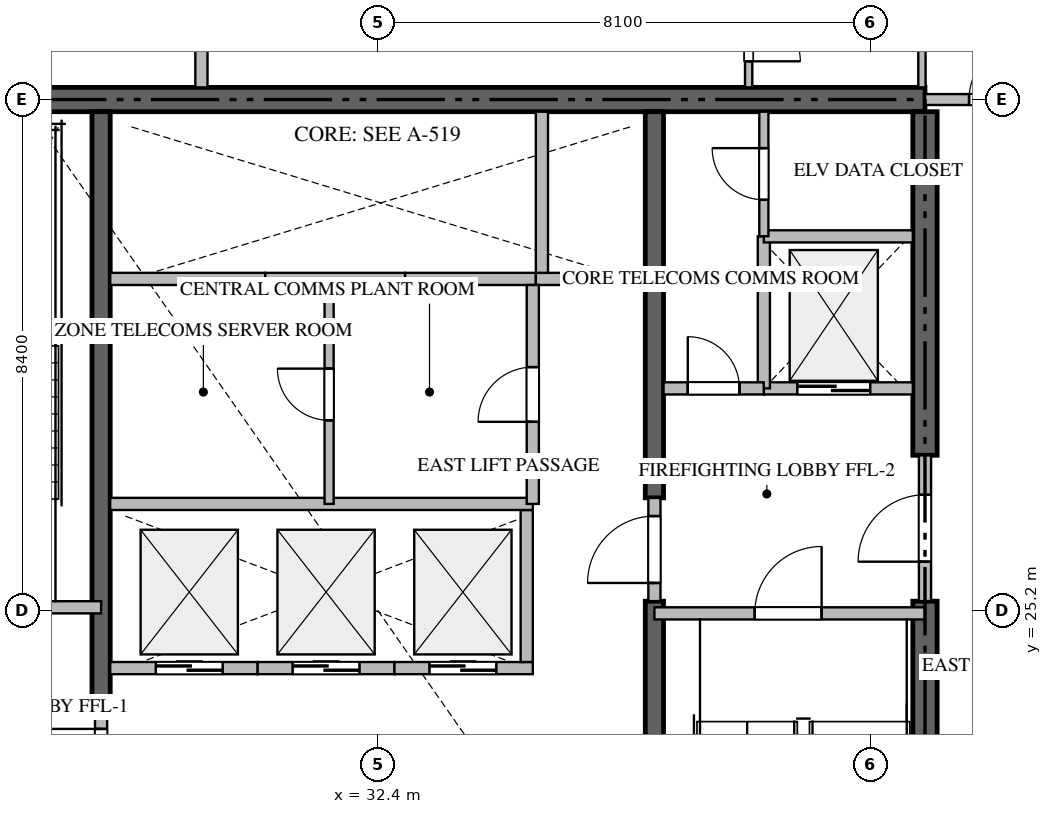
"""IFC4 building model, lengths in metres.
Left out: names, types, materials, properties, quantities, classifications, styles, units other than length and angle.
Written with IfcOpenShell. Run it as: python <this file> out.ifc"""

import sys

from ifc_helpers import new_model, si_unit, direction, frame, frame_2d, origin, place, context, subcontext, project, spatial, rectangle, extrude, source, transform, mapped, element, fill, save


model = new_model("IFC4")
c1 = context("Model", 3, precision=1e-05, world=origin(), true_north=direction((0.0, 1.0)))
c2 = subcontext(c1, "Body", "Model", "MODEL_VIEW")
j1 = project(units=[si_unit("LENGTHUNIT", "METRE"), si_unit("PLANEANGLEUNIT", "RADIAN")], contexts=[c1])
p1 = place(None, origin())
s1 = spatial("IfcSite", under=j1, at=p1, CompositionType="ELEMENT")
p2 = place(p1, origin())
s2 = spatial("IfcBuilding", under=s1, at=p2, CompositionType="ELEMENT")
p3 = place(p2, frame((0.0, 0.0, 187.65)))
s3 = spatial("IfcBuildingStorey", under=s2, at=p3, CompositionType="ELEMENT", Elevation=187.65)
p4 = place(p3, frame((41.4, 33.6, -0.26), z_axis=(0.0, 0.0, 1.0), x_axis=(-1.0, 0.0, 0.0)))
e1 = element("IfcWall", 1, at=p4, inside=s3, PredefinedType="SHEAR", context=c2, shape_type="SweptSolid", body=[
    extrude(rectangle(XDim=18.0, YDim=0.4, at=frame_2d((9.0, 0.0))), origin(), (0.0, 0.0, 1.0), 3.748),
])
p5 = place(p3, frame((41.4, 17.0, -0.26), z_axis=(0.0, 0.0, 1.0), x_axis=(0.0, 1.0, 0.0)))
e2 = element("IfcWall", 2, at=p5, inside=s3, PredefinedType="SHEAR", context=c2, shape_type="SweptSolid", body=[
    extrude(rectangle(XDim=8.35, YDim=0.4, at=frame_2d((4.175, 0.0))), origin(), (0.0, 0.0, 1.0), 3.748),
])
p6 = place(p3, frame((41.4, 27.75, -0.26), z_axis=(0.0, 0.0, 1.0), x_axis=(0.0, 1.0, 0.0)))
e3 = element("IfcWall", 3, at=p6, inside=s3, PredefinedType="SHEAR", context=c2, shape_type="SweptSolid", body=[
    extrude(rectangle(XDim=5.65, YDim=0.4, at=frame_2d((2.825, 0.0))), origin(), (0.0, 0.0, 1.0), 3.748),
])
p7 = place(p3, frame((27.85, 23.55, -0.26), z_axis=(0.0, 0.0, 1.0), x_axis=(0.0, 1.0, 0.0)))
e4 = element("IfcWall", 4, at=p7, inside=s3, PredefinedType="SHEAR", context=c2, shape_type="SweptSolid", body=[
    extrude(rectangle(XDim=9.85, YDim=0.3, at=frame_2d((4.925, 0.0))), origin(), (0.0, 0.0, 1.0), 3.748),
])
p8 = place(p3, frame((36.95, 17.0, -0.26), z_axis=(0.0, 0.0, 1.0), x_axis=(0.0, 1.0, 0.0)))
e5 = element("IfcWall", 5, at=p8, inside=s3, PredefinedType="SHEAR", context=c2, shape_type="SweptSolid", body=[
    extrude(rectangle(XDim=8.35, YDim=0.3, at=frame_2d((4.175, 0.0))), origin(), (0.0, 0.0, 1.0), 3.748),
])
p9 = place(p3, frame((36.95, 27.05, -0.26), z_axis=(0.0, 0.0, 1.0), x_axis=(0.0, 1.0, 0.0)))
e6 = element("IfcWall", 6, at=p9, inside=s3, PredefinedType="SHEAR", context=c2, shape_type="SweptSolid", body=[
    extrude(rectangle(XDim=6.35, YDim=0.3, at=frame_2d((3.175, 0.0))), origin(), (0.0, 0.0, 1.0), 3.748),
])
p10 = place(p3, frame((23.4, 25.25, 0.0), z_axis=(0.0, 0.0, 1.0), x_axis=(1.0, 0.0, 0.0)))
e7 = element("IfcWall", 7, at=p10, inside=s3, PredefinedType="STANDARD", context=c2, shape_type="SweptSolid", body=[
    extrude(rectangle(XDim=4.45, YDim=0.2, at=frame_2d((2.225, 0.0))), origin(), (0.0, 0.0, 1.0), 3.49),
])
p11 = place(p10, frame((1.65, 0.0, 0.0)))
e8 = element("IfcOpeningElement", 8, at=p11, cuts=e7, PredefinedType="OPENING", context=c2, shape_type="SweptSolid", body=[
    extrude(rectangle(XDim=1.1, YDim=2.15, at=frame_2d((0.55, 1.075))), frame((0.0, 0.11, 0.0), z_axis=(0.0, -1.0, 0.0), x_axis=(1.0, 0.0, 0.0)), (0.0, 0.0, 1.0), 0.22),
])
p12 = place(p3, frame((36.95, 25.15, 0.0), z_axis=(0.0, 0.0, 1.0), x_axis=(1.0, 0.0, 0.0)))
e9 = element("IfcWall", 9, at=p12, inside=s3, PredefinedType="STANDARD", context=c2, shape_type="SweptSolid", body=[
    extrude(rectangle(XDim=4.45, YDim=0.2, at=frame_2d((2.225, 0.0))), origin(), (0.0, 0.0, 1.0), 3.49),
])
p13 = place(p12, frame((1.65, 0.0, 0.0)))
e10 = element("IfcOpeningElement", 10, at=p13, cuts=e9, PredefinedType="OPENING", context=c2, shape_type="SweptSolid", body=[
    extrude(rectangle(XDim=1.1, YDim=2.15, at=frame_2d((0.55, 1.075))), frame((0.0, 0.11, 0.0), z_axis=(0.0, -1.0, 0.0), x_axis=(1.0, 0.0, 0.0)), (0.0, 0.0, 1.0), 0.22),
])
p14 = place(p3, frame((38.75, 28.85, 0.0), z_axis=(0.0, 0.0, 1.0), x_axis=(1.0, 0.0, 0.0)))
e11 = element("IfcWall", 11, at=p14, inside=s3, PredefinedType="STANDARD", context=c2, shape_type="SweptSolid", body=[
    extrude(rectangle(XDim=2.45, YDim=0.2, at=frame_2d((1.225, 0.0))), origin(), (0.0, 0.0, 1.0), 3.49),
])
p15 = place(p14, frame((0.55, 0.0, 0.0)))
e12 = element("IfcOpeningElement", 12, at=p15, cuts=e11, PredefinedType="OPENING", context=c2, shape_type="SweptSolid", body=[
    extrude(rectangle(XDim=1.2, YDim=2.2, at=frame_2d((0.6, 1.1))), frame((0.0, 0.11, 0.0), z_axis=(0.0, -1.0, 0.0), x_axis=(1.0, 0.0, 0.0)), (0.0, 0.0, 1.0), 0.22),
])
p16 = place(p3, frame((28.0, 24.25, 0.0), z_axis=(0.0, 0.0, 1.0), x_axis=(1.0, 0.0, 0.0)))
e13 = element("IfcWall", 13, at=p16, inside=s3, PredefinedType="STANDARD", context=c2, shape_type="SweptSolid", body=[
    extrude(rectangle(XDim=2.425, YDim=0.2, at=frame_2d((1.212, 0.0))), origin(), (0.0, 0.0, 1.0), 3.49),
])
p17 = place(p16, frame((0.75, 0.0, 0.0)))
e14 = element("IfcOpeningElement", 14, at=p17, cuts=e13, PredefinedType="OPENING", context=c2, shape_type="SweptSolid", body=[
    extrude(rectangle(XDim=1.1, YDim=2.2, at=frame_2d((0.55, 1.1))), frame((0.0, 0.11, 0.0), z_axis=(0.0, -1.0, 0.0), x_axis=(1.0, 0.0, 0.0)), (0.0, 0.0, 1.0), 0.22),
])
p18 = place(p3, frame((30.425, 24.25, 0.0), z_axis=(0.0, 0.0, 1.0), x_axis=(1.0, 0.0, 0.0)))
e15 = element("IfcWall", 15, at=p18, inside=s3, PredefinedType="STANDARD", context=c2, shape_type="SweptSolid", body=[
    extrude(rectangle(XDim=2.25, YDim=0.2, at=frame_2d((1.125, 0.0))), origin(), (0.0, 0.0, 1.0), 3.49),
])
p19 = place(p18, frame((0.575, 0.0, 0.0)))
e16 = element("IfcOpeningElement", 16, at=p19, cuts=e15, PredefinedType="OPENING", context=c2, shape_type="SweptSolid", body=[
    extrude(rectangle(XDim=1.1, YDim=2.2, at=frame_2d((0.55, 1.1))), frame((0.0, 0.11, 0.0), z_axis=(0.0, -1.0, 0.0), x_axis=(1.0, 0.0, 0.0)), (0.0, 0.0, 1.0), 0.22),
])
p20 = place(p3, frame((32.675, 24.25, 0.0), z_axis=(0.0, 0.0, 1.0), x_axis=(1.0, 0.0, 0.0)))
e17 = element("IfcWall", 17, at=p20, inside=s3, PredefinedType="STANDARD", context=c2, shape_type="SweptSolid", body=[
    extrude(rectangle(XDim=2.275, YDim=0.2, at=frame_2d((1.137, 0.0))), origin(), (0.0, 0.0, 1.0), 3.49),
])
p21 = place(p20, frame((0.575, 0.0, 0.0)))
e18 = element("IfcOpeningElement", 18, at=p21, cuts=e17, PredefinedType="OPENING", context=c2, shape_type="SweptSolid", body=[
    extrude(rectangle(XDim=1.1, YDim=2.2, at=frame_2d((0.55, 1.1))), frame((0.0, 0.11, 0.0), z_axis=(0.0, -1.0, 0.0), x_axis=(1.0, 0.0, 0.0)), (0.0, 0.0, 1.0), 0.22),
])
p22 = place(p3, frame((34.85, 24.35, 0.0), z_axis=(0.0, 0.0, 1.0), x_axis=(0.0, 1.0, 0.0)))
e19 = element("IfcWall", 19, at=p22, inside=s3, PredefinedType="STANDARD", context=c2, shape_type="SweptSolid", body=[
    extrude(rectangle(XDim=2.5, YDim=0.2, at=frame_2d((1.25, 0.0))), origin(), (0.0, 0.0, 1.0), 3.49),
])
p23 = place(p3, frame((28.0, 30.65, 0.0), z_axis=(0.0, 0.0, 1.0), x_axis=(1.0, 0.0, 0.0)))
e20 = element("IfcWall", 20, at=p23, inside=s3, PredefinedType="STANDARD", context=c2, shape_type="SweptSolid", body=[
    extrude(rectangle(XDim=2.55, YDim=0.2, at=frame_2d((1.275, 0.0))), origin(), (0.0, 0.0, 1.0), 3.49),
])
p24 = place(p3, frame((30.55, 30.65, 0.0), z_axis=(0.0, 0.0, 1.0), x_axis=(1.0, 0.0, 0.0)))
e21 = element("IfcWall", 21, at=p24, inside=s3, PredefinedType="STANDARD", context=c2, shape_type="SweptSolid", body=[
    extrude(rectangle(XDim=2.3, YDim=0.2, at=frame_2d((1.15, 0.0))), origin(), (0.0, 0.0, 1.0), 3.49),
])
p25 = place(p3, frame((32.85, 30.65, 0.0), z_axis=(0.0, 0.0, 1.0), x_axis=(1.0, 0.0, 0.0)))
e22 = element("IfcWall", 22, at=p25, inside=s3, PredefinedType="STANDARD", context=c2, shape_type="SweptSolid", body=[
    extrude(rectangle(XDim=2.15, YDim=0.2, at=frame_2d((1.075, 0.0))), origin(), (0.0, 0.0, 1.0), 3.49),
])
p26 = place(p3, frame((35.0, 30.65, 0.0), z_axis=(0.0, 0.0, 1.0), x_axis=(1.0, 0.0, 0.0)))
e23 = element("IfcWall", 23, at=p26, inside=s3, PredefinedType="STANDARD", context=c2, shape_type="SweptSolid", body=[
    extrude(rectangle(XDim=1.8, YDim=0.2, at=frame_2d((0.9, 0.0))), origin(), (0.0, 0.0, 1.0), 3.49),
])
p27 = place(p3, frame((35.1, 30.75, 0.0), z_axis=(0.0, 0.0, 1.0), x_axis=(0.0, 1.0, 0.0)))
e24 = element("IfcWall", 24, at=p27, inside=s3, PredefinedType="STANDARD", context=c2, shape_type="SweptSolid", body=[
    extrude(rectangle(XDim=2.65, YDim=0.2, at=frame_2d((1.325, 0.0))), origin(), (0.0, 0.0, 1.0), 3.49),
])
p28 = place(p3, frame((38.75, 28.85, 0.0), z_axis=(0.0, 0.0, 1.0), x_axis=(0.0, 1.0, 0.0)))
e25 = element("IfcWall", 25, at=p28, inside=s3, PredefinedType="STANDARD", context=c2, shape_type="SweptSolid", body=[
    extrude(rectangle(XDim=2.5, YDim=0.2, at=frame_2d((1.25, 0.0))), origin(), (0.0, 0.0, 1.0), 3.49),
])
p29 = place(p3, frame((38.75, 31.35, 0.0), z_axis=(0.0, 0.0, 1.0), x_axis=(1.0, 0.0, 0.0)))
e26 = element("IfcWall", 26, at=p29, inside=s3, PredefinedType="STANDARD", context=c2, shape_type="SweptSolid", body=[
    extrude(rectangle(XDim=2.45, YDim=0.2, at=frame_2d((1.225, 0.0))), origin(), (0.0, 0.0, 1.0), 3.49),
])
p30 = place(p3, frame((37.1, 28.85, 0.0), z_axis=(0.0, 0.0, 1.0), x_axis=(1.0, 0.0, 0.0)))
e27 = element("IfcWall", 27, at=p30, inside=s3, PredefinedType="STANDARD", context=c2, shape_type="SweptSolid", body=[
    extrude(rectangle(XDim=1.648, YDim=0.2, at=frame_2d((0.824, 0.0))), origin(), (0.0, 0.0, 1.0), 3.49),
])
p31 = place(p30, frame((0.399, 0.0, 0.0)))
e28 = element("IfcOpeningElement", 28, at=p31, cuts=e27, PredefinedType="OPENING", context=c2, shape_type="SweptSolid", body=[
    extrude(rectangle(XDim=0.85, YDim=2.1, at=frame_2d((0.425, 1.05))), frame((0.0, 0.11, 0.0), z_axis=(0.0, -1.0, 0.0), x_axis=(1.0, 0.0, 0.0)), (0.0, 0.0, 1.0), 0.22),
])
p32 = place(p3, frame((41.4, 25.352, 0.0), z_axis=(0.0, 0.0, 1.0), x_axis=(0.0, 1.0, 0.0)))
e29 = element("IfcWall", 29, at=p32, inside=s3, PredefinedType="STANDARD", context=c2, shape_type="SweptSolid", body=[
    extrude(rectangle(XDim=2.396, YDim=0.2, at=frame_2d((1.198, 0.0))), origin(), (0.0, 0.0, 1.0), 3.49),
])
p33 = place(p32, frame((0.648, 0.0, 0.0)))
e30 = element("IfcOpeningElement", 30, at=p33, cuts=e29, PredefinedType="OPENING", context=c2, shape_type="SweptSolid", body=[
    extrude(rectangle(XDim=1.1, YDim=2.15, at=frame_2d((0.55, 1.075))), frame((0.0, 0.11, 0.0), z_axis=(0.0, -1.0, 0.0), x_axis=(1.0, 0.0, 0.0)), (0.0, 0.0, 1.0), 0.22),
])
p34 = place(p3, frame((27.85, 21.852, 0.0), z_axis=(0.0, 0.0, 1.0), x_axis=(0.0, 1.0, 0.0)))
e31 = element("IfcWall", 31, at=p34, inside=s3, PredefinedType="STANDARD", context=c2, shape_type="SweptSolid", body=[
    extrude(rectangle(XDim=1.696, YDim=0.2, at=frame_2d((0.848, 0.0))), origin(), (0.0, 0.0, 1.0), 3.49),
])
p35 = place(p34, frame((0.298, 0.0, 0.0)))
e32 = element("IfcOpeningElement", 32, at=p35, cuts=e31, PredefinedType="OPENING", context=c2, shape_type="SweptSolid", body=[
    extrude(rectangle(XDim=1.1, YDim=2.15, at=frame_2d((0.55, 1.075))), frame((0.0, 0.11, 0.0), z_axis=(0.0, -1.0, 0.0), x_axis=(1.0, 0.0, 0.0)), (0.0, 0.0, 1.0), 0.22),
])
p36 = place(p3, frame((36.95, 25.352, 0.0), z_axis=(0.0, 0.0, 1.0), x_axis=(0.0, 1.0, 0.0)))
e33 = element("IfcWall", 33, at=p36, inside=s3, PredefinedType="STANDARD", context=c2, shape_type="SweptSolid", body=[
    extrude(rectangle(XDim=1.696, YDim=0.2, at=frame_2d((0.848, 0.0))), origin(), (0.0, 0.0, 1.0), 3.49),
])
p37 = place(p36, frame((0.298, 0.0, 0.0)))
e34 = element("IfcOpeningElement", 34, at=p37, cuts=e33, PredefinedType="OPENING", context=c2, shape_type="SweptSolid", body=[
    extrude(rectangle(XDim=1.1, YDim=2.15, at=frame_2d((0.55, 1.075))), frame((0.0, 0.11, 0.0), z_axis=(0.0, -1.0, 0.0), x_axis=(1.0, 0.0, 0.0)), (0.0, 0.0, 1.0), 0.22),
])
p38 = place(p3, frame((28.0, 26.95, 0.0), z_axis=(0.0, 0.0, 1.0), x_axis=(1.0, 0.0, 0.0)))
e35 = element("IfcWall", 35, at=p38, inside=s3, PredefinedType="STANDARD", context=c2, shape_type="SweptSolid", body=[
    extrude(rectangle(XDim=6.95, YDim=0.2, at=frame_2d((3.475, 0.0))), origin(), (0.0, 0.0, 1.0), 3.49),
])
p39 = place(p3, frame((38.75, 31.352, 0.0), z_axis=(0.0, 0.0, 1.0), x_axis=(0.0, 1.0, 0.0)))
e36 = element("IfcWall", 36, at=p39, inside=s3, PredefinedType="PARTITIONING", context=c2, shape_type="SweptSolid", body=[
    extrude(rectangle(XDim=2.048, YDim=0.15, at=frame_2d((1.024, 0.0))), origin(), (0.0, 0.0, 1.0), 3.49),
])
p40 = place(p39, frame((0.599, 0.0, 0.0)))
e37 = element("IfcOpeningElement", 37, at=p40, cuts=e36, PredefinedType="OPENING", context=c2, shape_type="SweptSolid", body=[
    extrude(rectangle(XDim=0.85, YDim=2.1, at=frame_2d((0.425, 1.05))), frame((0.0, 0.085, 0.0), z_axis=(0.0, -1.0, 0.0), x_axis=(1.0, 0.0, 0.0)), (0.0, 0.0, 1.0), 0.17),
])
p41 = place(p3, frame((34.95, 26.95, 0.0), z_axis=(0.0, 0.0, 1.0), x_axis=(0.0, 1.0, 0.0)))
e38 = element("IfcWall", 38, at=p41, inside=s3, PredefinedType="STANDARD", context=c2, shape_type="SweptSolid", body=[
    extrude(rectangle(XDim=3.6, YDim=0.2, at=frame_2d((1.8, 0.0))), origin(), (0.0, 0.0, 1.0), 3.49),
])
p42 = place(p41, frame((1.35, 0.0, 0.0)))
e39 = element("IfcOpeningElement", 39, at=p42, cuts=e38, PredefinedType="OPENING", context=c2, shape_type="SweptSolid", body=[
    extrude(rectangle(XDim=0.9, YDim=2.1, at=frame_2d((0.45, 1.05))), frame((0.0, 0.11, 0.0), z_axis=(0.0, -1.0, 0.0), x_axis=(1.0, 0.0, 0.0)), (0.0, 0.0, 1.0), 0.22),
])
p43 = place(p3, frame((31.6, 26.95, 0.0), z_axis=(0.0, 0.0, 1.0), x_axis=(0.0, 1.0, 0.0)))
e40 = element("IfcWall", 40, at=p43, inside=s3, PredefinedType="PARTITIONING", context=c2, shape_type="SweptSolid", body=[
    extrude(rectangle(XDim=3.6, YDim=0.15, at=frame_2d((1.8, 0.0))), origin(), (0.0, 0.0, 1.0), 3.49),
])
p44 = place(p43, frame((1.375, 0.0, 0.0)))
e41 = element("IfcOpeningElement", 41, at=p44, cuts=e40, PredefinedType="OPENING", context=c2, shape_type="SweptSolid", body=[
    extrude(rectangle(XDim=0.85, YDim=2.1, at=frame_2d((0.425, 1.05))), frame((0.0, 0.085, 0.0), z_axis=(0.0, -1.0, 0.0), x_axis=(1.0, 0.0, 0.0)), (0.0, 0.0, 1.0), 0.17),
])
p45 = place(p3, frame((29.5, 33.8, 0.0), z_axis=(0.0, 0.0, 1.0), x_axis=(0.0, 1.0, 0.0)))
e42 = element("IfcWall", 42, at=p45, inside=s3, PredefinedType="PARTITIONING", context=c2, shape_type="SweptSolid", body=[
    extrude(rectangle(XDim=15.118, YDim=0.2, at=frame_2d((7.559, 0.0))), origin(), (0.0, 0.0, 1.0), 3.49),
])
p46 = place(p3, frame((41.402, 33.6, 0.0), z_axis=(0.0, 0.0, 1.0), x_axis=(1.0, 0.0, 0.0)))
e43 = element("IfcWall", 43, at=p46, inside=s3, PredefinedType="PARTITIONING", context=c2, shape_type="SweptSolid", body=[
    extrude(rectangle(XDim=2.446, YDim=0.18, at=frame_2d((1.223, 0.0))), origin(), (0.0, 0.0, 1.0), 3.49),
])
p47 = place(p46, frame((0.723, 0.0, 0.0)))
e44 = element("IfcOpeningElement", 44, at=p47, cuts=e43, PredefinedType="OPENING", context=c2, shape_type="SweptSolid", body=[
    extrude(rectangle(XDim=1.0, YDim=2.15, at=frame_2d((0.5, 1.075))), frame((0.0, 0.1, 0.0), z_axis=(0.0, -1.0, 0.0), x_axis=(1.0, 0.0, 0.0)), (0.0, 0.0, 1.0), 0.2),
])
p48 = place(p3, frame((41.35, 36.35, 0.0), z_axis=(0.0, 0.0, 1.0), x_axis=(0.0, -1.0, 0.0)))
e45 = element("IfcWall", 45, at=p48, inside=s3, PredefinedType="PARTITIONING", context=c2, shape_type="SweptSolid", body=[
    extrude(rectangle(XDim=2.55, YDim=0.12, at=frame_2d((1.275, 0.0))), origin(), (0.0, 0.0, 1.0), 3.49),
])
p49 = place(p3, frame((38.5, 35.648, 0.0), z_axis=(0.0, 0.0, 1.0), x_axis=(0.0, -1.0, 0.0)))
e46 = element("IfcWall", 46, at=p49, inside=s3, PredefinedType="PARTITIONING", context=c2, shape_type="SweptSolid", body=[
    extrude(rectangle(XDim=1.848, YDim=0.12, at=frame_2d((0.924, 0.0))), origin(), (0.0, 0.0, 1.0), 3.49),
])
p50 = place(p49, frame((0.569, 0.0, 0.0)))
e47 = element("IfcOpeningElement", 47, at=p50, cuts=e46, PredefinedType="OPENING", context=c2, shape_type="SweptSolid", body=[
    extrude(rectangle(XDim=0.85, YDim=2.1, at=frame_2d((0.425, 1.05))), frame((0.0, 0.07, 0.0), z_axis=(0.0, -1.0, 0.0), x_axis=(1.0, 0.0, 0.0)), (0.0, 0.0, 1.0), 0.14),
])
m1 = source(origin(), c2, "Body", "SweptSolid", [
    extrude(rectangle(XDim=1.1, YDim=2.15, at=frame_2d((0.55, 1.075))), frame((0.0, 0.025, 0.0), z_axis=(0.0, -1.0, 0.0), x_axis=(1.0, 0.0, 0.0)), (0.0, 0.0, 1.0), 0.05),
])
p51 = place(p13, origin())
e48 = element("IfcDoor", 48, at=p51, inside=s3, OperationType="SINGLE_SWING_RIGHT", PredefinedType="DOOR", context=c2, shape_type="MappedRepresentation", body=[
    mapped(m1, transform((0.0, 0.0, 0.0), scale=1.0)),
])
fill(e10, e48)
m2 = source(origin(), c2, "Body", "SweptSolid", [
    extrude(rectangle(XDim=1.2, YDim=2.2, at=frame_2d((0.6, 1.1))), frame((0.0, 0.025, 0.0), z_axis=(0.0, -1.0, 0.0), x_axis=(1.0, 0.0, 0.0)), (0.0, 0.0, 1.0), 0.05),
])
p52 = place(p15, origin())
e49 = element("IfcDoor", 49, at=p52, inside=s3, OperationType="DOUBLE_DOOR_SLIDING", PredefinedType="DOOR", context=c2, shape_type="MappedRepresentation", body=[
    mapped(m2, transform((0.0, 0.0, 0.0), scale=1.0)),
])
fill(e12, e49)
m3 = source(origin(), c2, "Body", "SweptSolid", [
    extrude(rectangle(XDim=1.1, YDim=2.2, at=frame_2d((0.55, 1.1))), frame((0.0, 0.025, 0.0), z_axis=(0.0, -1.0, 0.0), x_axis=(1.0, 0.0, 0.0)), (0.0, 0.0, 1.0), 0.05),
])
p53 = place(p17, origin())
e50 = element("IfcDoor", 50, at=p53, inside=s3, OperationType="DOUBLE_DOOR_SLIDING", PredefinedType="DOOR", context=c2, shape_type="MappedRepresentation", body=[
    mapped(m3, transform((0.0, 0.0, 0.0), scale=1.0)),
])
fill(e14, e50)
p54 = place(p19, origin())
e51 = element("IfcDoor", 51, at=p54, inside=s3, OperationType="DOUBLE_DOOR_SLIDING", PredefinedType="DOOR", context=c2, shape_type="MappedRepresentation", body=[
    mapped(m3, transform((0.0, 0.0, 0.0), scale=1.0)),
])
fill(e16, e51)
p55 = place(p21, origin())
e52 = element("IfcDoor", 52, at=p55, inside=s3, OperationType="DOUBLE_DOOR_SLIDING", PredefinedType="DOOR", context=c2, shape_type="MappedRepresentation", body=[
    mapped(m3, transform((0.0, 0.0, 0.0), scale=1.0)),
])
fill(e18, e52)
m4 = source(origin(), c2, "Body", "SweptSolid", [
    extrude(rectangle(XDim=0.85, YDim=2.1, at=frame_2d((0.425, 1.05))), frame((0.0, 0.025, 0.0), z_axis=(0.0, -1.0, 0.0), x_axis=(1.0, 0.0, 0.0)), (0.0, 0.0, 1.0), 0.05),
])
p56 = place(p31, origin())
e53 = element("IfcDoor", 53, at=p56, inside=s3, OperationType="SINGLE_SWING_LEFT", PredefinedType="DOOR", context=c2, shape_type="MappedRepresentation", body=[
    mapped(m4, transform((0.0, 0.0, 0.0), scale=1.0)),
])
fill(e28, e53)
p57 = place(p33, origin())
e54 = element("IfcDoor", 54, at=p57, inside=s3, OperationType="SINGLE_SWING_LEFT", PredefinedType="DOOR", context=c2, shape_type="MappedRepresentation", body=[
    mapped(m1, transform((0.0, 0.0, 0.0), scale=1.0)),
])
fill(e30, e54)
p58 = place(p35, origin())
e55 = element("IfcDoor", 55, at=p58, inside=s3, OperationType="SINGLE_SWING_RIGHT", PredefinedType="DOOR", context=c2, shape_type="MappedRepresentation", body=[
    mapped(m1, transform((0.0, 0.0, 0.0), scale=1.0)),
])
fill(e32, e55)
p59 = place(p37, origin())
e56 = element("IfcDoor", 56, at=p59, inside=s3, OperationType="SINGLE_SWING_LEFT", PredefinedType="DOOR", context=c2, shape_type="MappedRepresentation", body=[
    mapped(m1, transform((0.0, 0.0, 0.0), scale=1.0)),
])
fill(e34, e56)
p60 = place(p40, origin())
e57 = element("IfcDoor", 57, at=p60, inside=s3, OperationType="SINGLE_SWING_RIGHT", PredefinedType="DOOR", context=c2, shape_type="MappedRepresentation", body=[
    mapped(m4, transform((0.0, 0.0, 0.0), scale=1.0)),
])
fill(e37, e57)
m5 = source(origin(), c2, "Body", "SweptSolid", [
    extrude(rectangle(XDim=0.9, YDim=2.1, at=frame_2d((0.45, 1.05))), frame((0.0, 0.025, 0.0), z_axis=(0.0, -1.0, 0.0), x_axis=(1.0, 0.0, 0.0)), (0.0, 0.0, 1.0), 0.05),
])
p61 = place(p42, origin())
e58 = element("IfcDoor", 58, at=p61, inside=s3, OperationType="SINGLE_SWING_LEFT", PredefinedType="DOOR", context=c2, shape_type="MappedRepresentation", body=[
    mapped(m5, transform((0.0, 0.0, 0.0), scale=1.0)),
])
fill(e39, e58)
p62 = place(p44, origin())
e59 = element("IfcDoor", 59, at=p62, inside=s3, OperationType="SINGLE_SWING_RIGHT", PredefinedType="DOOR", context=c2, shape_type="MappedRepresentation", body=[
    mapped(m4, transform((0.0, 0.0, 0.0), scale=1.0)),
])
fill(e41, e59)
m6 = source(origin(), c2, "Body", "SweptSolid", [
    extrude(rectangle(XDim=1.0, YDim=2.15, at=frame_2d((0.5, 1.075))), frame((0.0, 0.025, 0.0), z_axis=(0.0, -1.0, 0.0), x_axis=(1.0, 0.0, 0.0)), (0.0, 0.0, 1.0), 0.05),
])
p63 = place(p47, origin())
e60 = element("IfcDoor", 60, at=p63, inside=s3, OperationType="SINGLE_SWING_RIGHT", PredefinedType="DOOR", context=c2, shape_type="MappedRepresentation", body=[
    mapped(m6, transform((0.0, 0.0, 0.0), scale=1.0)),
])
fill(e44, e60)
p64 = place(p50, origin())
e61 = element("IfcDoor", 61, at=p64, inside=s3, OperationType="SINGLE_SWING_RIGHT", PredefinedType="DOOR", context=c2, shape_type="MappedRepresentation", body=[
    mapped(m4, transform((0.0, 0.0, 0.0), scale=1.0)),
])
fill(e47, e61)
save(model, sys.argv[1])
